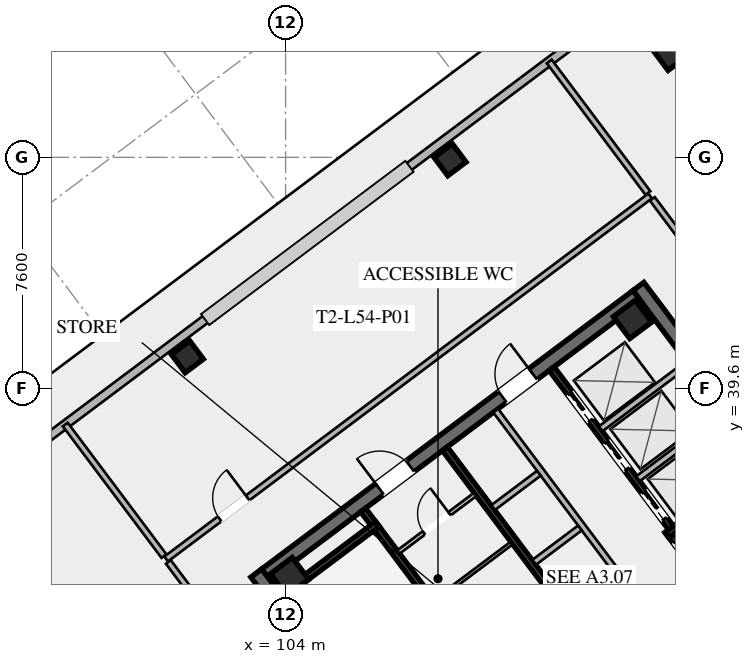
"""IFC4 building model, lengths in metres.
Left out: names, types, materials, properties, quantities, classifications, styles, units other than length and angle.
Written with IfcOpenShell. Run it as: python <this file> out.ifc"""

import sys

from ifc_helpers import new_model, si_unit, direction, frame, frame_2d, origin, origin_2d, place, context, subcontext, project, spatial, rectangle, hollow_rectangle, extrude, element, fill, save


model = new_model("IFC4")
c1 = context("Model", 3, precision=1e-05, world=origin(), true_north=direction((0.0, 1.0)))
c2 = subcontext(c1, "Body", "Model", "MODEL_VIEW")
j1 = project(units=[si_unit("LENGTHUNIT", "METRE"), si_unit("PLANEANGLEUNIT", "RADIAN")], contexts=[c1])
p1 = place(None, origin())
s1 = spatial("IfcSite", under=j1, at=p1, CompositionType="ELEMENT")
p2 = place(p1, origin())
s2 = spatial("IfcBuilding", under=s1, at=p2, CompositionType="ELEMENT")
p3 = place(p2, frame((0.0, 0.0, 199.6)))
s3 = spatial("IfcBuildingStorey", under=s2, at=p3, CompositionType="ELEMENT", Elevation=199.6)
for number, where, z_axis, x_axis in (
    (1, (112.396, 21.047, 0.0), (0.0, 0.0, 1.0), (-0.6, 0.8, 0.0)),
    (2, (115.604, 42.953, 0.0), (0.0, 0.0, 1.0), (0.6, -0.8, 0.0)),
):
    element("IfcWall", number, at=place(p3, frame(where, z_axis=z_axis, x_axis=x_axis)), inside=s3, PredefinedType="SHEAR", context=c2, shape_type="SweptSolid", body=[
        extrude(rectangle(XDim=15.6, YDim=0.45, at=frame_2d((7.8, 0.0))), origin(), (0.0, 0.0, 1.0), 4.6),
    ])
p4 = place(p3, frame((103.351, 33.482, 0.0), z_axis=(0.0, 0.0, 1.0), x_axis=(0.8, 0.6, 0.0)))
e3 = element("IfcWall", 3, at=p4, inside=s3, PredefinedType="SHEAR", context=c2, shape_type="SweptSolid", body=[
    extrude(rectangle(XDim=15.26, YDim=0.45, at=frame_2d((7.63, 0.0))), origin(), (0.0, 0.0, 1.0), 4.6),
])
p5 = place(p4, frame((4.68, 0.0, 0.0)))
e4 = element("IfcOpeningElement", 4, at=p5, cuts=e3, PredefinedType="OPENING", context=c2, shape_type="SweptSolid", body=[
    extrude(rectangle(XDim=1.25, YDim=2.25, at=frame_2d((0.625, 1.125))), frame((0.0, 0.235, 0.0), z_axis=(0.0, -1.0, 0.0), x_axis=(1.0, 0.0, 0.0)), (0.0, 0.0, 1.0), 0.47),
])
p6 = place(p4, frame((9.73, 0.0, 0.0)))
e5 = element("IfcOpeningElement", 5, at=p6, cuts=e3, PredefinedType="OPENING", context=c2, shape_type="SweptSolid", body=[
    extrude(rectangle(XDim=1.25, YDim=2.25, at=frame_2d((0.625, 1.125))), frame((0.0, 0.235, 0.0), z_axis=(0.0, -1.0, 0.0), x_axis=(1.0, 0.0, 0.0)), (0.0, 0.0, 1.0), 0.47),
])
for number, where, z_axis, x_axis in (
    (6, (115.41, 41.87, 0.0), (0.0, 0.0, 1.0), (0.8, 0.6, 0.0)),
    (7, (104.13, 33.41, 0.0), (0.0, 0.0, 1.0), (0.8, 0.6, 0.0)),
):
    element("IfcColumn", number, at=place(p3, frame(where, z_axis=z_axis, x_axis=x_axis)), inside=s3, PredefinedType="COLUMN", context=c2, shape_type="SweptSolid", body=[
        extrude(hollow_rectangle(XDim=0.9, YDim=0.9, WallThickness=0.04, at=origin_2d()), origin(), (0.0, 0.0, 1.0), 4.42),
    ])
p7 = place(p3, frame((116.68, 50.76, -0.295), z_axis=(0.0, 0.0, 1.0), x_axis=(0.799999996291, 0.600000004945, 0.0)))
e8 = element("IfcColumn", 8, at=p7, inside=s3, PredefinedType="COLUMN", context=c2, shape_type="SweptSolid", body=[
    extrude(hollow_rectangle(XDim=1.0, YDim=1.0, WallThickness=0.04, at=origin_2d()), origin(), (0.0, 0.0, 1.0), 4.715),
])
for number, where, z_axis, x_axis in (
    (9, (109.41, 47.12, -0.295), (0.0, 0.0, 1.0), (0.8, 0.6, 0.0)),
    (10, (100.77, 40.64, -0.295), (0.0, 0.0, 1.0), (0.8, 0.6, 0.0)),
):
    element("IfcColumn", number, at=place(p3, frame(where, z_axis=z_axis, x_axis=x_axis)), inside=s3, PredefinedType="COLUMN", context=c2, shape_type="SweptSolid", body=[
        extrude(hollow_rectangle(XDim=0.75, YDim=0.75, WallThickness=0.032, at=origin_2d()), origin(), (0.0, 0.0, 1.0), 4.715),
    ])
for number, where, z_axis, x_axis in (
    (11, (109.704, 11.928, 0.0), (0.0, 0.0, 1.0), (-0.6, 0.8, 0.0)),
    (12, (93.928, 36.296, 0.0), (0.0, 0.0, 1.0), (0.8, 0.6, 0.0)),
):
    element("IfcWall", number, at=place(p3, frame(where, z_axis=z_axis, x_axis=x_axis)), inside=s3, PredefinedType="SOLIDWALL", context=c2, shape_type="SweptSolid", body=[
        extrude(rectangle(XDim=26.96, YDim=0.28, at=frame_2d((13.48, 0.0))), origin(), (0.0, 0.0, 1.0), 4.42),
    ])
p8 = place(p3, frame((111.44, 29.08, 0.0), z_axis=(0.0, 0.0, 1.0), x_axis=(-0.59999041401, 0.800007189403, 0.0)))
e13 = element("IfcWall", 13, at=p8, inside=s3, PredefinedType="SHEAR", context=c2, shape_type="SweptSolid", body=[
    extrude(rectangle(XDim=8.15, YDim=0.2, at=frame_2d((4.075, 0.0))), origin(), (0.0, 0.0, 1.0), 4.42),
])
p9 = place(p8, frame((0.45, 0.0, 0.0)))
e14 = element("IfcOpeningElement", 14, at=p9, cuts=e13, PredefinedType="OPENING", context=c2, shape_type="SweptSolid", body=[
    extrude(rectangle(XDim=1.15, YDim=2.2, at=frame_2d((0.575, 1.1))), frame((0.0, 0.11, 0.0), z_axis=(0.0, -1.0, 0.0), x_axis=(1.0, 0.0, 0.0)), (0.0, 0.0, 1.0), 0.22),
])
p10 = place(p3, frame((103.876, 32.782, 0.0), z_axis=(0.0, 0.0, 1.0), x_axis=(0.800014909178, 0.599980120581, 0.0)))
e15 = element("IfcWall", 15, at=p10, inside=s3, PredefinedType="SHEAR", context=c2, shape_type="SweptSolid", body=[
    extrude(rectangle(XDim=3.93, YDim=0.2, at=frame_2d((1.965, 0.0))), origin(), (0.0, 0.0, 1.0), 4.42),
])
p11 = place(p3, frame((116.56, 34.92, 0.0), z_axis=(0.0, 0.0, 1.0), x_axis=(0.59999041401, -0.800007189403, 0.0)))
e16 = element("IfcWall", 16, at=p11, inside=s3, PredefinedType="SHEAR", context=c2, shape_type="SweptSolid", body=[
    extrude(rectangle(XDim=8.15, YDim=0.2, at=frame_2d((4.075, 0.0))), origin(), (0.0, 0.0, 1.0), 4.42),
])
p12 = place(p11, frame((0.45, 0.0, 0.0)))
e17 = element("IfcOpeningElement", 17, at=p12, cuts=e16, PredefinedType="OPENING", context=c2, shape_type="SweptSolid", body=[
    extrude(rectangle(XDim=1.15, YDim=2.2, at=frame_2d((0.575, 1.1))), frame((0.0, 0.11, 0.0), z_axis=(0.0, -1.0, 0.0), x_axis=(1.0, 0.0, 0.0)), (0.0, 0.0, 1.0), 0.22),
])
p13 = place(p3, frame((116.54, 34.78, 0.0), z_axis=(0.0, 0.0, 1.0), x_axis=(0.800014909178, 0.599980120581, 0.0)))
e18 = element("IfcWall", 18, at=p13, inside=s3, PredefinedType="SHEAR", context=c2, shape_type="SweptSolid", body=[
    extrude(rectangle(XDim=3.93, YDim=0.2, at=frame_2d((1.965, 0.0))), origin(), (0.0, 0.0, 1.0), 4.42),
])
p14 = place(p3, frame((118.058, 25.856, 0.0), z_axis=(0.0, 0.0, 1.0), x_axis=(-0.600002657301, 0.799998007018, 0.0)))
e19 = element("IfcWall", 19, at=p14, inside=s3, PredefinedType="SHEAR", context=c2, shape_type="SweptSolid", body=[
    extrude(rectangle(XDim=14.7, YDim=0.2, at=frame_2d((7.35, 0.0))), origin(), (0.0, 0.0, 1.0), 4.42),
])
p15 = place(p3, frame((112.75, 40.25, 0.0), z_axis=(0.0, 0.0, 1.0), x_axis=(0.599994036198, -0.800004472816, 0.0)))
e20 = element("IfcWall", 20, at=p15, inside=s3, PredefinedType="SHEAR", context=c2, shape_type="SweptSolid", body=[
    extrude(rectangle(XDim=6.55, YDim=0.2, at=frame_2d((3.275, 0.0))), origin(), (0.0, 0.0, 1.0), 4.42),
])
p16 = place(p15, frame((5.075, 0.0, 0.0)))
e21 = element("IfcOpeningElement", 21, at=p16, cuts=e20, PredefinedType="OPENING", context=c2, shape_type="SweptSolid", body=[
    extrude(rectangle(XDim=1.1, YDim=2.2, at=frame_2d((0.55, 1.1))), frame((0.0, 0.11, 0.0), z_axis=(0.0, -1.0, 0.0), x_axis=(1.0, 0.0, 0.0)), (0.0, 0.0, 1.0), 0.22),
])
p17 = place(p15, frame((3.025, 0.0, 0.0)))
e22 = element("IfcOpeningElement", 22, at=p17, cuts=e20, PredefinedType="OPENING", context=c2, shape_type="SweptSolid", body=[
    extrude(rectangle(XDim=1.1, YDim=2.2, at=frame_2d((0.55, 1.1))), frame((0.0, 0.11, 0.0), z_axis=(0.0, -1.0, 0.0), x_axis=(1.0, 0.0, 0.0)), (0.0, 0.0, 1.0), 0.22),
])
p18 = place(p15, frame((1.025, 0.0, 0.0)))
e23 = element("IfcOpeningElement", 23, at=p18, cuts=e20, PredefinedType="OPENING", context=c2, shape_type="SweptSolid", body=[
    extrude(rectangle(XDim=1.1, YDim=2.2, at=frame_2d((0.55, 1.1))), frame((0.0, 0.11, 0.0), z_axis=(0.0, -1.0, 0.0), x_axis=(1.0, 0.0, 0.0)), (0.0, 0.0, 1.0), 0.22),
])
for number, where, z_axis, x_axis in (
    (24, (115.59, 36.63, 0.0), (0.0, 0.0, 1.0), (0.8, 0.6, 0.0)),
    (25, (114.36, 38.27, 0.0), (0.0, 0.0, 1.0), (0.8, 0.6, 0.0)),
):
    element("IfcWall", number, at=place(p3, frame(where, z_axis=z_axis, x_axis=x_axis)), inside=s3, PredefinedType="SOLIDWALL", context=c2, shape_type="SweptSolid", body=[
        extrude(rectangle(XDim=3.58, YDim=0.2, at=frame_2d((1.79, 0.0))), origin(), (0.0, 0.0, 1.0), 4.42),
    ])
p19 = place(p3, frame((107.71, 34.22, 0.0), z_axis=(0.0, 0.0, 1.0), x_axis=(0.799981399002, 0.60002480053, 0.0)))
e26 = element("IfcWall", 26, at=p19, inside=s3, PredefinedType="PARTITIONING", context=c2, shape_type="SweptSolid", body=[
    extrude(rectangle(XDim=3.15, YDim=0.135, at=frame_2d((1.575, 0.0))), origin(), (0.0, 0.0, 1.0), 3.531),
])
p20 = place(p19, frame((1.05, 0.0, 0.0)))
e27 = element("IfcOpeningElement", 27, at=p20, cuts=e26, PredefinedType="OPENING", context=c2, shape_type="SweptSolid", body=[
    extrude(rectangle(XDim=1.05, YDim=2.2, at=frame_2d((0.525, 1.1))), frame((0.0, 0.077, 0.0), z_axis=(0.0, -1.0, 0.0), x_axis=(1.0, 0.0, 0.0)), (0.0, 0.0, 1.0), 0.155),
])
p21 = place(p3, frame((108.91, 32.62, 0.0), z_axis=(0.0, 0.0, 1.0), x_axis=(0.800018601094, 0.59997519774, 0.0)))
e28 = element("IfcWall", 28, at=p21, inside=s3, PredefinedType="PARTITIONING", context=c2, shape_type="SweptSolid", body=[
    extrude(rectangle(XDim=3.15, YDim=0.11, at=frame_2d((1.575, 0.0))), origin(), (0.0, 0.0, 1.0), 3.531),
])
p22 = place(p3, frame((115.11, 33.27, 0.0), z_axis=(0.0, 0.0, 1.0), x_axis=(-0.600011160345, 0.79999162962, 0.0)))
e29 = element("IfcWall", 29, at=p22, inside=s3, PredefinedType="SOLIDWALL", context=c2, shape_type="SweptSolid", body=[
    extrude(rectangle(XDim=7.0, YDim=0.2, at=frame_2d((3.5, 0.0))), origin(), (0.0, 0.0, 1.0), 4.42),
])
p23 = place(p3, frame((113.526, 32.082, 0.0), z_axis=(0.0, 0.0, 1.0), x_axis=(0.800046745961, 0.599937666993, 0.0)))
e30 = element("IfcWall", 30, at=p23, inside=s3, PredefinedType="SOLIDWALL", context=c2, shape_type="SweptSolid", body=[
    extrude(rectangle(XDim=1.88, YDim=0.2, at=frame_2d((0.94, 0.0))), origin(), (0.0, 0.0, 1.0), 4.42),
])
p24 = place(p3, frame((112.176, 33.882, 0.0), z_axis=(0.0, 0.0, 1.0), x_axis=(0.8, 0.6, 0.0)))
e31 = element("IfcWall", 31, at=p24, inside=s3, PredefinedType="SOLIDWALL", context=c2, shape_type="SweptSolid", body=[
    extrude(rectangle(XDim=1.88, YDim=0.2, at=frame_2d((0.94, 0.0))), origin(), (0.0, 0.0, 1.0), 4.42),
])
p25 = place(p3, frame((110.826, 35.682, 0.0), z_axis=(0.0, 0.0, 1.0), x_axis=(0.799984418148, 0.600020775241, 0.0)))
e32 = element("IfcWall", 32, at=p25, inside=s3, PredefinedType="SOLIDWALL", context=c2, shape_type="SweptSolid", body=[
    extrude(rectangle(XDim=1.88, YDim=0.2, at=frame_2d((0.94, 0.0))), origin(), (0.0, 0.0, 1.0), 4.42),
])
p26 = place(p3, frame((100.07, 33.99, 0.0), z_axis=(0.0, 0.0, 1.0), x_axis=(0.8, 0.6, 0.0)))
e33 = element("IfcWall", 33, at=p26, inside=s3, PredefinedType="SOLIDWALL", context=c2, shape_type="SweptSolid", body=[
    extrude(rectangle(XDim=19.9, YDim=0.2, at=frame_2d((9.95, 0.0))), origin(), (0.0, 0.0, 1.0), 3.531),
])
p27 = place(p26, frame((2.2, 0.0, 0.0)))
e34 = element("IfcOpeningElement", 34, at=p27, cuts=e33, PredefinedType="OPENING", context=c2, shape_type="SweptSolid", body=[
    extrude(rectangle(XDim=1.15, YDim=2.2, at=frame_2d((0.575, 1.1))), frame((0.0, 0.11, 0.0), z_axis=(0.0, -1.0, 0.0), x_axis=(1.0, 0.0, 0.0)), (0.0, 0.0, 1.0), 0.22),
])
p28 = place(p3, frame((116.062, 45.834, 0.0), z_axis=(0.0, 0.0, 1.0), x_axis=(0.599987849816, -0.800009112494, 0.0)))
e35 = element("IfcWall", 35, at=p28, inside=s3, PredefinedType="SOLIDWALL", context=c2, shape_type="SweptSolid", body=[
    extrude(rectangle(XDim=6.43, YDim=0.2, at=frame_2d((3.215, 0.0))), origin(), (0.0, 0.0, 1.0), 3.531),
])
p29 = place(p28, frame((3.0, 0.0, 0.0)))
e36 = element("IfcOpeningElement", 36, at=p29, cuts=e35, PredefinedType="OPENING", context=c2, shape_type="SweptSolid", body=[
    extrude(rectangle(XDim=1.25, YDim=2.25, at=frame_2d((0.625, 1.125))), frame((0.0, 0.11, 0.0), z_axis=(0.0, -1.0, 0.0), x_axis=(1.0, 0.0, 0.0)), (0.0, 0.0, 1.0), 0.22),
])
p30 = place(p3, frame((111.938, 18.166, 0.0), z_axis=(0.0, 0.0, 1.0), x_axis=(-0.59999602618, 0.80000298035, 0.0)))
e37 = element("IfcWall", 37, at=p30, inside=s3, PredefinedType="SOLIDWALL", context=c2, shape_type="SweptSolid", body=[
    extrude(rectangle(XDim=19.66, YDim=0.2, at=frame_2d((9.83, 0.0))), origin(), (0.0, 0.0, 1.0), 3.531),
])
p31 = place(p30, frame((3.0, 0.0, 0.0)))
e38 = element("IfcOpeningElement", 38, at=p31, cuts=e37, PredefinedType="OPENING", context=c2, shape_type="SweptSolid", body=[
    extrude(rectangle(XDim=1.25, YDim=2.25, at=frame_2d((0.625, 1.125))), frame((0.0, 0.11, 0.0), z_axis=(0.0, -1.0, 0.0), x_axis=(1.0, 0.0, 0.0)), (0.0, 0.0, 1.0), 0.22),
])
p32 = place(p30, frame((13.2, 0.0, 0.0)))
e39 = element("IfcOpeningElement", 39, at=p32, cuts=e37, PredefinedType="OPENING", context=c2, shape_type="SweptSolid", body=[
    extrude(rectangle(XDim=1.15, YDim=2.2, at=frame_2d((0.575, 1.1))), frame((0.0, 0.11, 0.0), z_axis=(0.0, -1.0, 0.0), x_axis=(1.0, 0.0, 0.0)), (0.0, 0.0, 1.0), 0.22),
])
p33 = place(p3, frame((99.998, 34.086, 0.0), z_axis=(0.0, 0.0, 1.0), x_axis=(-0.6, 0.8, 0.0)))
e40 = element("IfcWall", 40, at=p33, inside=s3, PredefinedType="SOLIDWALL", context=c2, shape_type="SweptSolid", body=[
    extrude(rectangle(XDim=5.41, YDim=0.2, at=frame_2d((2.705, 0.0))), origin(), (0.0, 0.0, 1.0), 3.531),
])
p34 = place(p3, frame((115.918, 46.026, 0.0), z_axis=(0.0, 0.0, 1.0), x_axis=(-0.599971117961, 0.800021660715, 0.0)))
e41 = element("IfcWall", 41, at=p34, inside=s3, PredefinedType="SOLIDWALL", context=c2, shape_type="SweptSolid", body=[
    extrude(rectangle(XDim=5.41, YDim=0.2, at=frame_2d((2.705, 0.0))), origin(), (0.0, 0.0, 1.0), 3.531),
])
p35 = place(p5, origin())
e42 = element("IfcDoor", 42, at=p35, inside=s3, OperationType="SINGLE_SWING_LEFT", PredefinedType="DOOR", context=c2, shape_type="SweptSolid", body=[
    extrude(rectangle(XDim=1.25, YDim=2.25, at=frame_2d((0.625, 1.125))), frame((0.0, 0.025, 0.0), z_axis=(0.0, -1.0, 0.0), x_axis=(1.0, 0.0, 0.0)), (0.0, 0.0, 1.0), 0.05),
])
fill(e4, e42)
p36 = place(p6, origin())
e43 = element("IfcDoor", 43, at=p36, inside=s3, OperationType="SINGLE_SWING_RIGHT", PredefinedType="DOOR", context=c2, shape_type="SweptSolid", body=[
    extrude(rectangle(XDim=1.25, YDim=2.25, at=frame_2d((0.625, 1.125))), frame((0.0, 0.025, 0.0), z_axis=(0.0, -1.0, 0.0), x_axis=(1.0, 0.0, 0.0)), (0.0, 0.0, 1.0), 0.05),
])
fill(e5, e43)
p37 = place(p12, origin())
e44 = element("IfcDoor", 44, at=p37, inside=s3, OperationType="SINGLE_SWING_RIGHT", PredefinedType="DOOR", context=c2, shape_type="SweptSolid", body=[
    extrude(rectangle(XDim=1.15, YDim=2.2, at=frame_2d((0.575, 1.1))), frame((0.0, 0.025, 0.0), z_axis=(0.0, -1.0, 0.0), x_axis=(1.0, 0.0, 0.0)), (0.0, 0.0, 1.0), 0.05),
])
fill(e17, e44)
p38 = place(p20, origin())
e45 = element("IfcDoor", 45, at=p38, inside=s3, OperationType="SINGLE_SWING_RIGHT", PredefinedType="DOOR", context=c2, shape_type="SweptSolid", body=[
    extrude(rectangle(XDim=1.05, YDim=2.2, at=frame_2d((0.525, 1.1))), frame((0.0, 0.025, 0.0), z_axis=(0.0, -1.0, 0.0), x_axis=(1.0, 0.0, 0.0)), (0.0, 0.0, 1.0), 0.05),
])
fill(e27, e45)
p39 = place(p27, origin())
e46 = element("IfcDoor", 46, at=p39, inside=s3, OperationType="SINGLE_SWING_RIGHT", PredefinedType="DOOR", context=c2, shape_type="SweptSolid", body=[
    extrude(rectangle(XDim=1.15, YDim=2.2, at=frame_2d((0.575, 1.1))), frame((0.0, 0.025, 0.0), z_axis=(0.0, -1.0, 0.0), x_axis=(1.0, 0.0, 0.0)), (0.0, 0.0, 1.0), 0.05),
])
fill(e34, e46)
p40 = place(p16, origin())
e47 = element("IfcDoor", 47, at=p40, inside=s3, OperationType="SLIDING_TO_LEFT", PredefinedType="DOOR", context=c2, shape_type="SweptSolid", body=[
    extrude(rectangle(XDim=1.1, YDim=2.2, at=frame_2d((0.55, 1.1))), frame((0.0, 0.025, 0.0), z_axis=(0.0, -1.0, 0.0), x_axis=(1.0, 0.0, 0.0)), (0.0, 0.0, 1.0), 0.05),
])
fill(e21, e47)
p41 = place(p17, origin())
e48 = element("IfcDoor", 48, at=p41, inside=s3, OperationType="SLIDING_TO_LEFT", PredefinedType="DOOR", context=c2, shape_type="SweptSolid", body=[
    extrude(rectangle(XDim=1.1, YDim=2.2, at=frame_2d((0.55, 1.1))), frame((0.0, 0.025, 0.0), z_axis=(0.0, -1.0, 0.0), x_axis=(1.0, 0.0, 0.0)), (0.0, 0.0, 1.0), 0.05),
])
fill(e22, e48)
p42 = place(p18, origin())
e49 = element("IfcDoor", 49, at=p42, inside=s3, OperationType="SLIDING_TO_LEFT", PredefinedType="DOOR", context=c2, shape_type="SweptSolid", body=[
    extrude(rectangle(XDim=1.1, YDim=2.2, at=frame_2d((0.55, 1.1))), frame((0.0, 0.025, 0.0), z_axis=(0.0, -1.0, 0.0), x_axis=(1.0, 0.0, 0.0)), (0.0, 0.0, 1.0), 0.05),
])
fill(e23, e49)
save(model, sys.argv[1])
